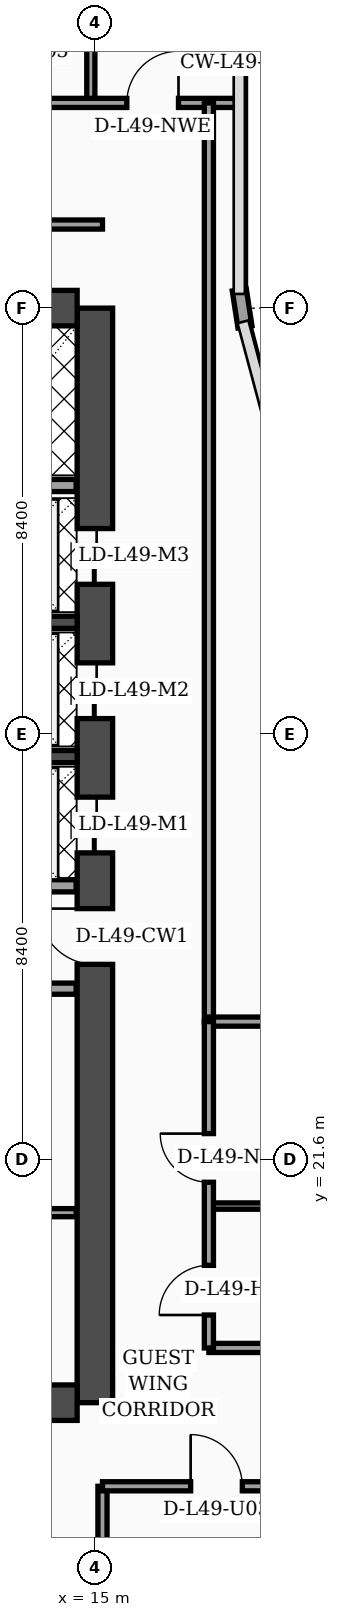
"""IFC4 building model, lengths in metres.
Left out: names, types, materials, properties, quantities, classifications, styles, units other than length and angle.
Written with IfcOpenShell. Run it as: python <this file> out.ifc"""

import sys

from ifc_helpers import new_model, si_unit, direction, frame, frame_2d, origin, place, context, subcontext, project, spatial, rectangle, extrude, element, fill, save


model = new_model("IFC4")
c1 = context("Model", 3, precision=1e-05, world=origin(), true_north=direction((0.0, 1.0)))
c2 = subcontext(c1, "Body", "Model", "MODEL_VIEW")
j1 = project(units=[si_unit("LENGTHUNIT", "METRE"), si_unit("PLANEANGLEUNIT", "RADIAN")], contexts=[c1])
p1 = place(None, origin())
s1 = spatial("IfcSite", under=j1, at=p1, CompositionType="ELEMENT")
p2 = place(p1, origin())
s2 = spatial("IfcBuilding", under=s1, at=p2, CompositionType="ELEMENT")
p3 = place(p2, frame((0.0, 0.0, 199.6)))
s3 = spatial("IfcBuildingStorey", under=s2, at=p3, CompositionType="ELEMENT", Elevation=199.6)
p4 = place(p3, frame((15.0, 16.8, 0.0), z_axis=(0.0, 0.0, 1.0), x_axis=(0.0, 1.0, 0.0)))
e1 = element("IfcWall", 1, at=p4, inside=s3, PredefinedType="SHEAR", context=c2, shape_type="SweptSolid", body=[
    extrude(rectangle(XDim=21.6, YDim=0.7, at=frame_2d((10.8, 0.0))), origin(), (0.0, 0.0, 1.0), 3.56),
])
p5 = place(p4, frame((8.65, 0.0, 0.0)))
e2 = element("IfcOpeningElement", 2, at=p5, cuts=e1, PredefinedType="OPENING", context=c2, shape_type="SweptSolid", body=[
    extrude(rectangle(XDim=1.1, YDim=2.2, at=frame_2d((0.55, 1.1))), frame((0.0, 0.36, 0.0), z_axis=(0.0, -1.0, 0.0), x_axis=(1.0, 0.0, 0.0)), (0.0, 0.0, 1.0), 0.72),
])
p6 = place(p4, frame((10.85, 0.0, 0.0)))
e3 = element("IfcOpeningElement", 3, at=p6, cuts=e1, PredefinedType="OPENING", context=c2, shape_type="SweptSolid", body=[
    extrude(rectangle(XDim=1.1, YDim=2.2, at=frame_2d((0.55, 1.1))), frame((0.0, 0.36, 0.0), z_axis=(0.0, -1.0, 0.0), x_axis=(1.0, 0.0, 0.0)), (0.0, 0.0, 1.0), 0.72),
])
p7 = place(p4, frame((13.5, 0.0, 0.0)))
e4 = element("IfcOpeningElement", 4, at=p7, cuts=e1, PredefinedType="OPENING", context=c2, shape_type="SweptSolid", body=[
    extrude(rectangle(XDim=1.1, YDim=2.2, at=frame_2d((0.55, 1.1))), frame((0.0, 0.36, 0.0), z_axis=(0.0, -1.0, 0.0), x_axis=(1.0, 0.0, 0.0)), (0.0, 0.0, 1.0), 0.72),
])
p8 = place(p4, frame((16.15, 0.0, 0.0)))
e5 = element("IfcOpeningElement", 5, at=p8, cuts=e1, PredefinedType="OPENING", context=c2, shape_type="SweptSolid", body=[
    extrude(rectangle(XDim=1.1, YDim=2.2, at=frame_2d((0.55, 1.1))), frame((0.0, 0.36, 0.0), z_axis=(0.0, -1.0, 0.0), x_axis=(1.0, 0.0, 0.0)), (0.0, 0.0, 1.0), 0.72),
])
for number, where, z_axis, x_axis in (
    (6, (4.55, 38.4, 0.0), (0.0, 0.0, 1.0), (1.0, 0.0, 0.0)),
    (7, (4.55, 16.8, 0.0), (0.0, 0.0, 1.0), (1.0, 0.0, 0.0)),
):
    element("IfcWall", number, at=place(p3, frame(where, z_axis=z_axis, x_axis=x_axis)), inside=s3, PredefinedType="SHEAR", context=c2, shape_type="SweptSolid", body=[
        extrude(rectangle(XDim=10.1, YDim=0.7, at=frame_2d((5.05, 0.0))), origin(), (0.0, 0.0, 1.0), 3.56),
    ])
for number, where, z_axis, x_axis in (
    (8, (12.18, 29.55, 0.0), (0.0, 0.0, 1.0), (1.0, 0.0, 0.0)),
    (9, (12.18, 32.2, 0.0), (0.0, 0.0, 1.0), (1.0, 0.0, 0.0)),
):
    element("IfcWall", number, at=place(p3, frame(where, z_axis=z_axis, x_axis=x_axis)), inside=s3, PredefinedType="SOLIDWALL", context=c2, shape_type="SweptSolid", body=[
        extrude(rectangle(XDim=2.47, YDim=0.24, at=frame_2d((1.235, 0.0))), origin(), (0.0, 0.0, 1.0), 3.56),
    ])
p9 = place(p3, frame((17.962, 38.03, 0.0), z_axis=(0.0, 0.0, 1.0), x_axis=(-0.15141125477, 0.988470855377, 0.0)))
e10 = element("IfcWall", 10, at=p9, inside=s3, PredefinedType="SOLIDWALL", context=c2, shape_type="SweptSolid", body=[
    extrude(rectangle(XDim=0.739, YDim=0.28, at=frame_2d((0.369, 0.0))), origin(), (0.0, 0.0, 1.0), 3.56),
])
p10 = place(p3, frame((9.68, 20.55, 0.0), z_axis=(0.0, 0.0, 1.0), x_axis=(1.0, 0.0, 0.0)))
e11 = element("IfcWall", 11, at=p10, inside=s3, PredefinedType="PARTITIONING", context=c2, shape_type="SweptSolid", body=[
    extrude(rectangle(XDim=4.95, YDim=0.16, at=frame_2d((2.475, 0.0))), origin(), (0.0, 0.0, 1.0), 3.56),
])
p11 = place(p10, frame((1.1, 0.0, 0.0)))
e12 = element("IfcOpeningElement", 12, at=p11, cuts=e11, PredefinedType="OPENING", context=c2, shape_type="SweptSolid", body=[
    extrude(rectangle(XDim=0.98, YDim=2.15, at=frame_2d((0.49, 1.075))), frame((0.0, 0.09, 0.0), z_axis=(0.0, -1.0, 0.0), x_axis=(1.0, 0.0, 0.0)), (0.0, 0.0, 1.0), 0.18),
])
p12 = place(p3, frame((9.68, 24.97, 0.0), z_axis=(0.0, 0.0, 1.0), x_axis=(1.0, 0.0, 0.0)))
e13 = element("IfcWall", 13, at=p12, inside=s3, PredefinedType="SOLIDWALL", context=c2, shape_type="SweptSolid", body=[
    extrude(rectangle(XDim=4.95, YDim=0.22, at=frame_2d((2.475, 0.0))), origin(), (0.0, 0.0, 1.0), 2.94),
])
p13 = place(p12, frame((0.9, 0.0, 0.0)))
e14 = element("IfcOpeningElement", 14, at=p13, cuts=e13, PredefinedType="OPENING", context=c2, shape_type="SweptSolid", body=[
    extrude(rectangle(XDim=0.98, YDim=2.15, at=frame_2d((0.49, 1.075))), frame((0.0, 0.12, 0.0), z_axis=(0.0, -1.0, 0.0), x_axis=(1.0, 0.0, 0.0)), (0.0, 0.0, 1.0), 0.24),
])
p14 = place(p3, frame((12.25, 27.0, 0.0), z_axis=(0.0, 0.0, 1.0), x_axis=(1.0, 0.0, 0.0)))
e15 = element("IfcWall", 15, at=p14, inside=s3, PredefinedType="SOLIDWALL", context=c2, shape_type="SweptSolid", body=[
    extrude(rectangle(XDim=2.38, YDim=0.24, at=frame_2d((1.19, 0.0))), origin(), (0.0, 0.0, 1.0), 3.56),
])
p15 = place(p3, frame((9.66, 34.9, 0.0), z_axis=(0.0, 0.0, 1.0), x_axis=(1.0, 0.0, 0.0)))
e16 = element("IfcWall", 16, at=p15, inside=s3, PredefinedType="SOLIDWALL", context=c2, shape_type="SweptSolid", body=[
    extrude(rectangle(XDim=4.97, YDim=0.24, at=frame_2d((2.485, 0.0))), origin(), (0.0, 0.0, 1.0), 3.56),
])
p16 = place(p3, frame((15.15, 2.44, 0.0), z_axis=(0.0, 0.0, 1.0), x_axis=(0.0, 1.0, 0.0)))
e17 = element("IfcWall", 17, at=p16, inside=s3, PredefinedType="PARTITIONING", context=c2, shape_type="SweptSolid", body=[
    extrude(rectangle(XDim=12.71, YDim=0.18, at=frame_2d((6.355, 0.0))), origin(), (0.0, 0.0, 1.0), 3.09),
])
p17 = place(p3, frame((15.15, 15.15, 0.0), z_axis=(0.0, 0.0, 1.0), x_axis=(1.0, 0.0, 0.0)))
e18 = element("IfcWall", 18, at=p17, inside=s3, PredefinedType="PARTITIONING", context=c2, shape_type="SweptSolid", body=[
    extrude(rectangle(XDim=6.45, YDim=0.18, at=frame_2d((3.225, 0.0))), origin(), (0.0, 0.0, 1.0), 2.59),
])
p18 = place(p17, frame((1.74, 0.0, 0.0)))
e19 = element("IfcOpeningElement", 19, at=p18, cuts=e18, PredefinedType="OPENING", context=c2, shape_type="SweptSolid", body=[
    extrude(rectangle(XDim=1.02, YDim=2.2, at=frame_2d((0.51, 1.1))), frame((0.0, 0.1, 0.0), z_axis=(0.0, -1.0, 0.0), x_axis=(1.0, 0.0, 0.0)), (0.0, 0.0, 1.0), 0.2),
])
p19 = place(p3, frame((14.92, 42.45, 0.0), z_axis=(0.0, 0.0, 1.0), x_axis=(0.0, 1.0, 0.0)))
e20 = element("IfcWall", 20, at=p19, inside=s3, PredefinedType="PARTITIONING", context=c2, shape_type="SweptSolid", body=[
    extrude(rectangle(XDim=5.35, YDim=0.16, at=frame_2d((2.675, 0.0))), origin(), (0.0, 0.0, 1.0), 3.09),
])
p20 = place(p3, frame((0.08, 42.45, 0.0), z_axis=(0.0, 0.0, 1.0), x_axis=(1.0, 0.0, 0.0)))
e21 = element("IfcWall", 21, at=p20, inside=s3, PredefinedType="PARTITIONING", context=c2, shape_type="SweptSolid", body=[
    extrude(rectangle(XDim=17.77, YDim=0.18, at=frame_2d((8.885, 0.0))), origin(), (0.0, 0.0, 1.0), 2.94),
])
p21 = place(p20, frame((0.9, 0.0, 0.0)))
e22 = element("IfcOpeningElement", 22, at=p21, cuts=e21, PredefinedType="OPENING", context=c2, shape_type="SweptSolid", body=[
    extrude(rectangle(XDim=1.02, YDim=2.2, at=frame_2d((0.51, 1.1))), frame((0.0, 0.1, 0.0), z_axis=(0.0, -1.0, 0.0), x_axis=(1.0, 0.0, 0.0)), (0.0, 0.0, 1.0), 0.2),
])
p22 = place(p20, frame((4.2, 0.0, 0.0)))
e23 = element("IfcOpeningElement", 23, at=p22, cuts=e21, PredefinedType="OPENING", context=c2, shape_type="SweptSolid", body=[
    extrude(rectangle(XDim=1.02, YDim=2.2, at=frame_2d((0.51, 1.1))), frame((0.0, 0.1, 0.0), z_axis=(0.0, -1.0, 0.0), x_axis=(1.0, 0.0, 0.0)), (0.0, 0.0, 1.0), 0.2),
])
p23 = place(p20, frame((10.08, 0.0, 0.0)))
e24 = element("IfcOpeningElement", 24, at=p23, cuts=e21, PredefinedType="OPENING", context=c2, shape_type="SweptSolid", body=[
    extrude(rectangle(XDim=1.02, YDim=2.2, at=frame_2d((0.51, 1.1))), frame((0.0, 0.1, 0.0), z_axis=(0.0, -1.0, 0.0), x_axis=(1.0, 0.0, 0.0)), (0.0, 0.0, 1.0), 0.2),
])
p24 = place(p20, frame((15.55, 0.0, 0.0)))
e25 = element("IfcOpeningElement", 25, at=p24, cuts=e21, PredefinedType="OPENING", context=c2, shape_type="SweptSolid", body=[
    extrude(rectangle(XDim=1.02, YDim=2.2, at=frame_2d((0.51, 1.1))), frame((0.0, 0.1, 0.0), z_axis=(0.0, -1.0, 0.0), x_axis=(1.0, 0.0, 0.0)), (0.0, 0.0, 1.0), 0.2),
])
p25 = place(p3, frame((17.25, 24.3, 0.0), z_axis=(0.0, 0.0, 1.0), x_axis=(0.0, 1.0, 0.0)))
e26 = element("IfcWall", 26, at=p25, inside=s3, PredefinedType="PARTITIONING", context=c2, shape_type="SweptSolid", body=[
    extrude(rectangle(XDim=18.15, YDim=0.18, at=frame_2d((9.075, 0.0))), origin(), (0.0, 0.0, 1.0), 2.94),
])
p26 = place(p3, frame((3.83, 40.05, 0.0), z_axis=(0.0, 0.0, 1.0), x_axis=(1.0, 0.0, 0.0)))
e27 = element("IfcWall", 27, at=p26, inside=s3, PredefinedType="PARTITIONING", context=c2, shape_type="SweptSolid", body=[
    extrude(rectangle(XDim=11.32, YDim=0.18, at=frame_2d((5.66, 0.0))), origin(), (0.0, 0.0, 1.0), 2.94),
])
p27 = place(p3, frame((17.25, 17.88, 0.0), z_axis=(0.0, 0.0, 1.0), x_axis=(1.0, 0.0, 0.0)))
e28 = element("IfcWall", 28, at=p27, inside=s3, PredefinedType="PARTITIONING", context=c2, shape_type="SweptSolid", body=[
    extrude(rectangle(XDim=4.3, YDim=0.18, at=frame_2d((2.15, 0.0))), origin(), (0.0, 0.0, 1.0), 3.09),
])
p28 = place(p3, frame((17.25, 20.68, 0.0), z_axis=(0.0, 0.0, 1.0), x_axis=(1.0, 0.0, 0.0)))
e29 = element("IfcWall", 29, at=p28, inside=s3, PredefinedType="PARTITIONING", context=c2, shape_type="SweptSolid", body=[
    extrude(rectangle(XDim=4.3, YDim=0.125, at=frame_2d((2.15, 0.0))), origin(), (0.0, 0.0, 1.0), 3.56),
])
p29 = place(p3, frame((17.25, 24.32, 0.0), z_axis=(0.0, 0.0, 1.0), x_axis=(1.0, 0.0, 0.0)))
e30 = element("IfcWall", 30, at=p29, inside=s3, PredefinedType="PARTITIONING", context=c2, shape_type="SweptSolid", body=[
    extrude(rectangle(XDim=4.35, YDim=0.18, at=frame_2d((2.175, 0.0))), origin(), (0.0, 0.0, 1.0), 3.56),
])
p30 = place(p3, frame((17.25, 17.88, 0.0), z_axis=(0.0, 0.0, 1.0), x_axis=(0.0, 1.0, 0.0)))
e31 = element("IfcWall", 31, at=p30, inside=s3, PredefinedType="PARTITIONING", context=c2, shape_type="SweptSolid", body=[
    extrude(rectangle(XDim=6.44, YDim=0.18, at=frame_2d((3.22, 0.0))), origin(), (0.0, 0.0, 1.0), 3.09),
])
p31 = place(p30, frame((0.65, 0.0, 0.0)))
e32 = element("IfcOpeningElement", 32, at=p31, cuts=e31, PredefinedType="OPENING", context=c2, shape_type="SweptSolid", body=[
    extrude(rectangle(XDim=0.98, YDim=2.15, at=frame_2d((0.49, 1.075))), frame((0.0, 0.1, 0.0), z_axis=(0.0, -1.0, 0.0), x_axis=(1.0, 0.0, 0.0)), (0.0, 0.0, 1.0), 0.2),
])
p32 = place(p30, frame((3.27, 0.0, 0.0)))
e33 = element("IfcOpeningElement", 33, at=p32, cuts=e31, PredefinedType="OPENING", context=c2, shape_type="SweptSolid", body=[
    extrude(rectangle(XDim=0.96, YDim=2.2, at=frame_2d((0.48, 1.1))), frame((0.0, 0.1, 0.0), z_axis=(0.0, -1.0, 0.0), x_axis=(1.0, 0.0, 0.0)), (0.0, 0.0, 1.0), 0.2),
])
p33 = place(p18, origin())
e34 = element("IfcDoor", 34, at=p33, inside=s3, OperationType="SINGLE_SWING_LEFT", PredefinedType="DOOR", context=c2, shape_type="SweptSolid", body=[
    extrude(rectangle(XDim=1.02, YDim=2.2, at=frame_2d((0.51, 1.1))), frame((0.0, 0.025, 0.0), z_axis=(0.0, -1.0, 0.0), x_axis=(1.0, 0.0, 0.0)), (0.0, 0.0, 1.0), 0.05),
])
fill(e19, e34)
p34 = place(p24, origin())
e35 = element("IfcDoor", 35, at=p34, inside=s3, OperationType="SINGLE_SWING_RIGHT", PredefinedType="DOOR", context=c2, shape_type="SweptSolid", body=[
    extrude(rectangle(XDim=1.02, YDim=2.2, at=frame_2d((0.51, 1.1))), frame((0.0, 0.025, 0.0), z_axis=(0.0, -1.0, 0.0), x_axis=(1.0, 0.0, 0.0)), (0.0, 0.0, 1.0), 0.05),
])
fill(e25, e35)
p35 = place(p31, origin())
e36 = element("IfcDoor", 36, at=p35, inside=s3, OperationType="SINGLE_SWING_LEFT", PredefinedType="DOOR", context=c2, shape_type="SweptSolid", body=[
    extrude(rectangle(XDim=0.98, YDim=2.15, at=frame_2d((0.49, 1.075))), frame((0.0, 0.025, 0.0), z_axis=(0.0, -1.0, 0.0), x_axis=(1.0, 0.0, 0.0)), (0.0, 0.0, 1.0), 0.05),
])
fill(e32, e36)
p36 = place(p32, origin())
e37 = element("IfcDoor", 37, at=p36, inside=s3, OperationType="SINGLE_SWING_RIGHT", PredefinedType="DOOR", context=c2, shape_type="SweptSolid", body=[
    extrude(rectangle(XDim=0.96, YDim=2.2, at=frame_2d((0.48, 1.1))), frame((0.0, 0.025, 0.0), z_axis=(0.0, -1.0, 0.0), x_axis=(1.0, 0.0, 0.0)), (0.0, 0.0, 1.0), 0.05),
])
fill(e33, e37)
p37 = place(p5, origin())
e38 = element("IfcDoor", 38, at=p37, inside=s3, OperationType="SINGLE_SWING_RIGHT", PredefinedType="DOOR", context=c2, shape_type="SweptSolid", body=[
    extrude(rectangle(XDim=1.1, YDim=2.2, at=frame_2d((0.55, 1.1))), frame((0.0, 0.025, 0.0), z_axis=(0.0, -1.0, 0.0), x_axis=(1.0, 0.0, 0.0)), (0.0, 0.0, 1.0), 0.05),
])
fill(e2, e38)
p38 = place(p6, origin())
e39 = element("IfcDoor", 39, at=p38, inside=s3, OperationType="DOUBLE_DOOR_SLIDING", PredefinedType="DOOR", context=c2, shape_type="SweptSolid", body=[
    extrude(rectangle(XDim=1.1, YDim=2.2, at=frame_2d((0.55, 1.1))), frame((0.0, 0.025, 0.0), z_axis=(0.0, -1.0, 0.0), x_axis=(1.0, 0.0, 0.0)), (0.0, 0.0, 1.0), 0.05),
])
fill(e3, e39)
p39 = place(p7, origin())
e40 = element("IfcDoor", 40, at=p39, inside=s3, OperationType="DOUBLE_DOOR_SLIDING", PredefinedType="DOOR", context=c2, shape_type="SweptSolid", body=[
    extrude(rectangle(XDim=1.1, YDim=2.2, at=frame_2d((0.55, 1.1))), frame((0.0, 0.025, 0.0), z_axis=(0.0, -1.0, 0.0), x_axis=(1.0, 0.0, 0.0)), (0.0, 0.0, 1.0), 0.05),
])
fill(e4, e40)
p40 = place(p8, origin())
e41 = element("IfcDoor", 41, at=p40, inside=s3, OperationType="DOUBLE_DOOR_SLIDING", PredefinedType="DOOR", context=c2, shape_type="SweptSolid", body=[
    extrude(rectangle(XDim=1.1, YDim=2.2, at=frame_2d((0.55, 1.1))), frame((0.0, 0.025, 0.0), z_axis=(0.0, -1.0, 0.0), x_axis=(1.0, 0.0, 0.0)), (0.0, 0.0, 1.0), 0.05),
])
fill(e5, e41)
save(model, sys.argv[1])
